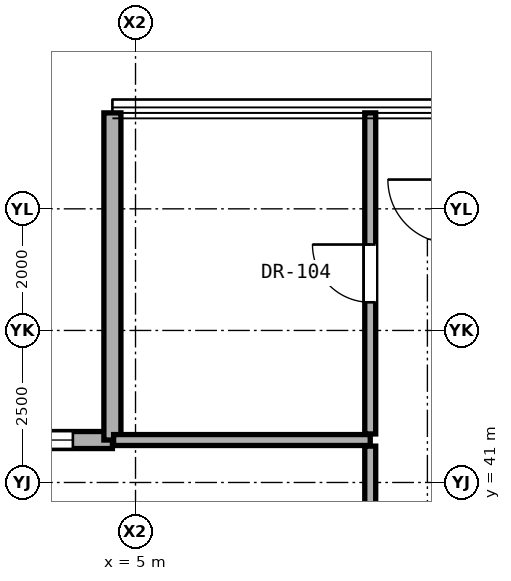
"""IFC4 building model, lengths in metres.
Left out: names, types, materials, properties, quantities, classifications, styles, units other than length and angle.
Written with IfcOpenShell. Run it as: python <this file> out.ifc"""

import sys

from ifc_helpers import new_model, si_unit, direction, frame, frame_2d, origin, place, context, subcontext, project, spatial, rectangle, extrude, element, fill, save


model = new_model("IFC4")
c1 = context("Model", 3, precision=1e-05, world=origin(), true_north=direction((0.0, 1.0)))
c2 = subcontext(c1, "Body", "Model", "MODEL_VIEW")
j1 = project(units=[si_unit("LENGTHUNIT", "METRE"), si_unit("PLANEANGLEUNIT", "RADIAN")], contexts=[c1])
p1 = place(None, origin())
s1 = spatial("IfcSite", under=j1, at=p1, CompositionType="ELEMENT")
p2 = place(p1, origin())
s2 = spatial("IfcBuilding", under=s1, at=p2, CompositionType="ELEMENT")
p3 = place(p2, frame((0.0, 0.0, 25.7)))
s3 = spatial("IfcBuildingStorey", under=s2, at=p3, CompositionType="ELEMENT", Elevation=25.7)
p4 = place(p3, frame((4.62, 41.698, 0.0), z_axis=(0.0, 0.0, 1.0), x_axis=(-1.0, 0.0, 0.0)))
e1 = element("IfcWall", 1, at=p4, inside=s3, PredefinedType="SOLIDWALL", context=c2, shape_type="SweptSolid", body=[
    extrude(rectangle(XDim=5.38, YDim=0.28, at=frame_2d((2.69, 0.0))), origin(), (0.0, 0.0, 1.0), 3.04),
])
p5 = place(p4, frame((0.65, 0.0, 0.85)))
e2 = element("IfcOpeningElement", 2, at=p5, cuts=e1, PredefinedType="OPENING", context=c2, shape_type="SweptSolid", body=[
    extrude(rectangle(XDim=1.1, YDim=2.0, at=frame_2d((0.55, 1.0))), frame((0.0, 0.15, 0.0), z_axis=(0.0, -1.0, 0.0), x_axis=(1.0, 0.0, 0.0)), (0.0, 0.0, 1.0), 0.3),
])
p6 = place(p3, frame((4.62, 47.078, 0.0), z_axis=(0.0, 0.0, 1.0), x_axis=(0.0, -1.0, 0.0)))
e3 = element("IfcWall", 3, at=p6, inside=s3, PredefinedType="SOLIDWALL", context=c2, shape_type="SweptSolid", body=[
    extrude(rectangle(XDim=5.38, YDim=0.28, at=frame_2d((2.69, 0.0))), origin(), (0.0, 0.0, 1.0), 3.04),
])
p7 = place(p3, frame((4.64, 41.698, 0.0), z_axis=(0.0, 0.0, 1.0), x_axis=(1.0, 0.0, 0.0)))
e4 = element("IfcWall", 4, at=p7, inside=s3, PredefinedType="PARTITIONING", context=c2, shape_type="SweptSolid", body=[
    extrude(rectangle(XDim=4.22, YDim=0.18, at=frame_2d((2.11, 0.0))), origin(), (0.0, 0.0, 1.0), 3.06),
])
p8 = place(p3, frame((8.86, 32.921, 0.0), z_axis=(0.0, 0.0, 1.0), x_axis=(0.0, 1.0, 0.0)))
e5 = element("IfcWall", 5, at=p8, inside=s3, PredefinedType="PARTITIONING", context=c2, shape_type="SweptSolid", body=[
    extrude(rectangle(XDim=8.677, YDim=0.18, at=frame_2d((4.338, 0.0))), origin(), (0.0, 0.0, 1.0), 2.436),
])
p9 = place(p8, frame((3.813, 0.0, 0.0)))
e6 = element("IfcOpeningElement", 6, at=p9, cuts=e5, PredefinedType="OPENING", context=c2, shape_type="SweptSolid", body=[
    extrude(rectangle(XDim=1.05, YDim=2.2, at=frame_2d((0.525, 1.1))), frame((0.0, 0.1, 0.0), z_axis=(0.0, -1.0, 0.0), x_axis=(1.0, 0.0, 0.0)), (0.0, 0.0, 1.0), 0.2),
])
p10 = place(p3, frame((8.86, 41.798, 0.0), z_axis=(0.0, 0.0, 1.0), x_axis=(0.0, 1.0, 0.0)))
e7 = element("IfcWall", 7, at=p10, inside=s3, PredefinedType="PARTITIONING", context=c2, shape_type="SweptSolid", body=[
    extrude(rectangle(XDim=5.28, YDim=0.18, at=frame_2d((2.64, 0.0))), origin(), (0.0, 0.0, 1.0), 3.06),
])
p11 = place(p10, frame((2.165, 0.0, 0.0)))
e8 = element("IfcOpeningElement", 8, at=p11, cuts=e7, PredefinedType="OPENING", context=c2, shape_type="SweptSolid", body=[
    extrude(rectangle(XDim=0.95, YDim=2.15, at=frame_2d((0.475, 1.075))), frame((0.0, 0.1, 0.0), z_axis=(0.0, -1.0, 0.0), x_axis=(1.0, 0.0, 0.0)), (0.0, 0.0, 1.0), 0.2),
])
p12 = place(p5, origin())
e9 = element("IfcWindow", 9, at=p12, inside=s3, PartitioningType="SINGLE_PANEL", PredefinedType="WINDOW", context=c2, shape_type="SweptSolid", body=[
    extrude(rectangle(XDim=1.1, YDim=2.0, at=frame_2d((0.55, 1.0))), frame((0.0, 0.03, 0.0), z_axis=(0.0, -1.0, 0.0), x_axis=(1.0, 0.0, 0.0)), (0.0, 0.0, 1.0), 0.06),
])
fill(e2, e9)
p13 = place(p11, origin())
e10 = element("IfcDoor", 10, at=p13, inside=s3, OperationType="SINGLE_SWING_RIGHT", PredefinedType="DOOR", context=c2, shape_type="SweptSolid", body=[
    extrude(rectangle(XDim=0.95, YDim=2.15, at=frame_2d((0.475, 1.075))), frame((0.0, 0.025, 0.0), z_axis=(0.0, -1.0, 0.0), x_axis=(1.0, 0.0, 0.0)), (0.0, 0.0, 1.0), 0.05),
])
fill(e8, e10)
save(model, sys.argv[1])
